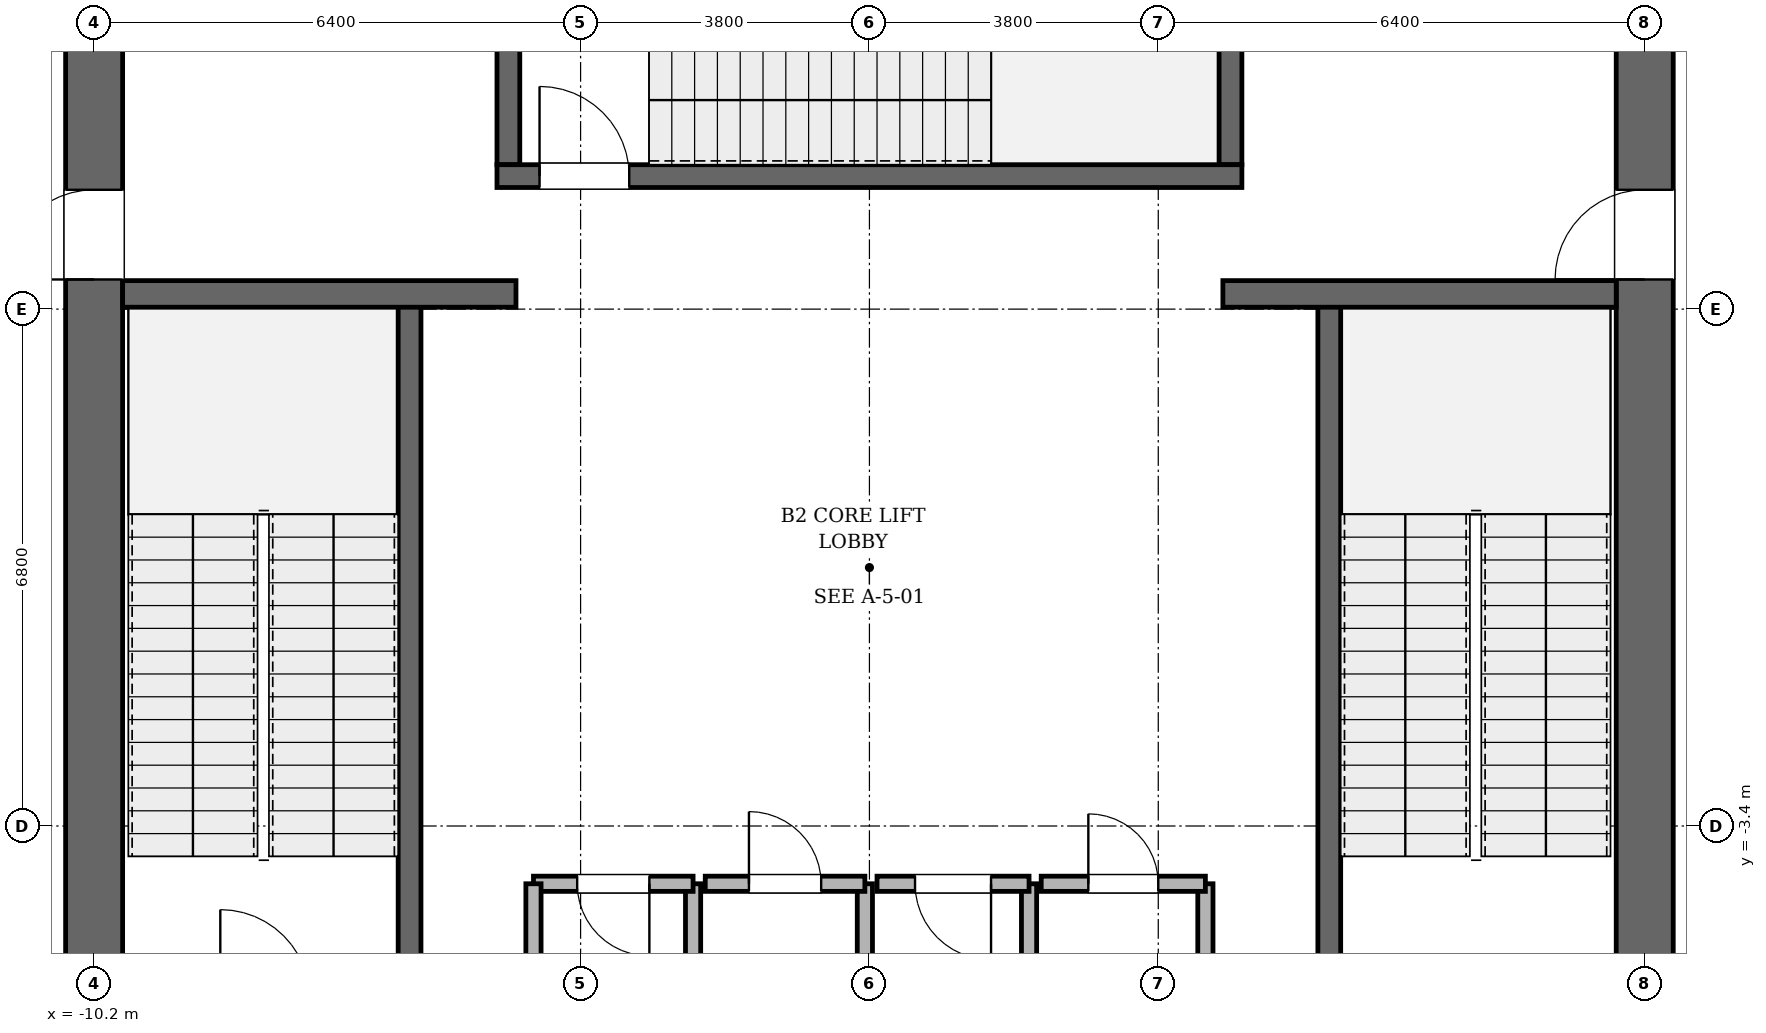
"""IFC4 building model, lengths in metres.
Left out: names, types, materials, properties, quantities, classifications, styles, units other than length and angle.
Written with IfcOpenShell. Run it as: python <this file> out.ifc"""

import sys

from ifc_helpers import new_model, si_unit, direction, frame, frame_2d, origin, place, context, subcontext, project, spatial, rectangle, extrude, element, fill, save


model = new_model("IFC4")
c1 = context("Model", 3, precision=1e-05, world=origin(), true_north=direction((0.0, 1.0)))
c2 = subcontext(c1, "Body", "Model", "MODEL_VIEW")
j1 = project(units=[si_unit("LENGTHUNIT", "METRE"), si_unit("PLANEANGLEUNIT", "RADIAN")], contexts=[c1])
p1 = place(None, origin())
s1 = spatial("IfcSite", under=j1, at=p1, CompositionType="ELEMENT")
p2 = place(p1, origin())
s2 = spatial("IfcBuilding", under=s1, at=p2, CompositionType="ELEMENT")
p3 = place(p2, frame((0.0, 0.0, -9.6)))
s3 = spatial("IfcBuildingStorey", under=s2, at=p3, CompositionType="ELEMENT", Elevation=-9.6)
p4 = place(p3, frame((-10.2, -8.825, 0.0), z_axis=(0.0, 0.0, 1.0), x_axis=(0.0, 1.0, 0.0)))
e1 = element("IfcWall", 1, at=p4, inside=s3, PredefinedType="SHEAR", context=c2, shape_type="SweptSolid", body=[
    extrude(rectangle(XDim=17.65, YDim=0.75, at=frame_2d((8.825, 0.0))), origin(), (0.0, 0.0, 1.0), 4.8),
])
p5 = place(p4, frame((12.615, 0.0, 0.0)))
e2 = element("IfcOpeningElement", 2, at=p5, cuts=e1, PredefinedType="OPENING", context=c2, shape_type="SweptSolid", body=[
    extrude(rectangle(XDim=1.18, YDim=2.2, at=frame_2d((0.59, 1.1))), frame((0.0, 0.385, 0.0), z_axis=(0.0, -1.0, 0.0), x_axis=(1.0, 0.0, 0.0)), (0.0, 0.0, 1.0), 0.77),
])
p6 = place(p3, frame((10.2, 8.825, 0.0), z_axis=(0.0, 0.0, 1.0), x_axis=(0.0, -1.0, 0.0)))
e3 = element("IfcWall", 3, at=p6, inside=s3, PredefinedType="SHEAR", context=c2, shape_type="SweptSolid", body=[
    extrude(rectangle(XDim=17.65, YDim=0.75, at=frame_2d((8.825, 0.0))), origin(), (0.0, 0.0, 1.0), 4.8),
])
p7 = place(p6, frame((3.855, 0.0, 0.0)))
e4 = element("IfcOpeningElement", 4, at=p7, cuts=e3, PredefinedType="OPENING", context=c2, shape_type="SweptSolid", body=[
    extrude(rectangle(XDim=1.18, YDim=2.2, at=frame_2d((0.59, 1.1))), frame((0.0, 0.385, 0.0), z_axis=(0.0, -1.0, 0.0), x_axis=(1.0, 0.0, 0.0)), (0.0, 0.0, 1.0), 0.77),
])
for number, where, z_axis, x_axis in (
    (5, (-6.05, -5.5, 0.0), (0.0, 0.0, 1.0), (0.0, 1.0, 0.0)),
    (6, (6.05, 3.45, 0.0), (0.0, 0.0, 1.0), (0.0, -1.0, 0.0)),
):
    element("IfcWall", number, at=place(p3, frame(where, z_axis=z_axis, x_axis=x_axis)), inside=s3, PredefinedType="SOLIDWALL", context=c2, shape_type="SweptSolid", body=[
        extrude(rectangle(XDim=8.95, YDim=0.3, at=frame_2d((4.475, 0.0))), origin(), (0.0, 0.0, 1.0), 4.8),
    ])
for number, where, z_axis, x_axis in (
    (7, (-4.75, 5.3, 0.0), (0.0, 0.0, 1.0), (0.0, 1.0, 0.0)),
    (8, (4.75, 8.825, 0.0), (0.0, 0.0, 1.0), (0.0, -1.0, 0.0)),
):
    element("IfcWall", number, at=place(p3, frame(where, z_axis=z_axis, x_axis=x_axis)), inside=s3, PredefinedType="SOLIDWALL", context=c2, shape_type="SweptSolid", body=[
        extrude(rectangle(XDim=3.525, YDim=0.3, at=frame_2d((1.762, 0.0))), origin(), (0.0, 0.0, 1.0), 4.8),
    ])
p8 = place(p3, frame((-4.9, 5.15, 0.0), z_axis=(0.0, 0.0, 1.0), x_axis=(1.0, 0.0, 0.0)))
e9 = element("IfcWall", 9, at=p8, inside=s3, PredefinedType="SOLIDWALL", context=c2, shape_type="SweptSolid", body=[
    extrude(rectangle(XDim=9.8, YDim=0.3, at=frame_2d((4.9, 0.0))), origin(), (0.0, 0.0, 1.0), 4.8),
])
p9 = place(p8, frame((0.56, 0.0, 0.0)))
e10 = element("IfcOpeningElement", 10, at=p9, cuts=e9, PredefinedType="OPENING", context=c2, shape_type="SweptSolid", body=[
    extrude(rectangle(XDim=1.18, YDim=2.2, at=frame_2d((0.59, 1.1))), frame((0.0, 0.16, 0.0), z_axis=(0.0, -1.0, 0.0), x_axis=(1.0, 0.0, 0.0)), (0.0, 0.0, 1.0), 0.32),
])
for number, where, z_axis, x_axis in (
    (11, (-9.825, 3.6, 0.0), (0.0, 0.0, 1.0), (1.0, 0.0, 0.0)),
    (12, (4.65, 3.6, 0.0), (0.0, 0.0, 1.0), (1.0, 0.0, 0.0)),
):
    element("IfcWall", number, at=place(p3, frame(where, z_axis=z_axis, x_axis=x_axis)), inside=s3, PredefinedType="SOLIDWALL", context=c2, shape_type="SweptSolid", body=[
        extrude(rectangle(XDim=5.175, YDim=0.35, at=frame_2d((2.587, 0.0))), origin(), (0.0, 0.0, 1.0), 4.8),
    ])
p10 = place(p3, frame((-2.32, -5.9, 0.0), z_axis=(0.0, 0.0, 1.0), x_axis=(0.0, 1.0, 0.0)))
e13 = element("IfcWall", 13, at=p10, inside=s3, PredefinedType="SOLIDWALL", context=c2, shape_type="SweptSolid", body=[
    extrude(rectangle(XDim=1.74, YDim=0.2, at=frame_2d((0.87, 0.0))), origin(), (0.0, 0.0, 1.0), 4.52),
])
p11 = place(p3, frame((-2.32, -4.16, 0.0), z_axis=(0.0, 0.0, 1.0), x_axis=(-1.0, 0.0, 0.0)))
e14 = element("IfcWall", 14, at=p11, inside=s3, PredefinedType="SOLIDWALL", context=c2, shape_type="SweptSolid", body=[
    extrude(rectangle(XDim=2.1, YDim=0.2, at=frame_2d((1.05, 0.0))), origin(), (0.0, 0.0, 1.0), 4.52),
])
p12 = place(p11, frame((0.575, 0.0, 0.0)))
e15 = element("IfcOpeningElement", 15, at=p12, cuts=e14, PredefinedType="OPENING", context=c2, shape_type="SweptSolid", body=[
    extrude(rectangle(XDim=0.95, YDim=2.15, at=frame_2d((0.475, 1.075))), frame((0.0, 0.11, 0.0), z_axis=(0.0, -1.0, 0.0), x_axis=(1.0, 0.0, 0.0)), (0.0, 0.0, 1.0), 0.22),
])
for number, where, z_axis, x_axis in (
    (16, (-4.42, -4.16, 0.0), (0.0, 0.0, 1.0), (0.0, -1.0, 0.0)),
    (17, (-0.06, -5.9, 0.0), (0.0, 0.0, 1.0), (0.0, 1.0, 0.0)),
):
    element("IfcWall", number, at=place(p3, frame(where, z_axis=z_axis, x_axis=x_axis)), inside=s3, PredefinedType="SOLIDWALL", context=c2, shape_type="SweptSolid", body=[
        extrude(rectangle(XDim=1.74, YDim=0.2, at=frame_2d((0.87, 0.0))), origin(), (0.0, 0.0, 1.0), 4.52),
    ])
p13 = place(p3, frame((-0.06, -4.16, 0.0), z_axis=(0.0, 0.0, 1.0), x_axis=(-1.0, 0.0, 0.0)))
e18 = element("IfcWall", 18, at=p13, inside=s3, PredefinedType="SOLIDWALL", context=c2, shape_type="SweptSolid", body=[
    extrude(rectangle(XDim=2.1, YDim=0.2, at=frame_2d((1.05, 0.0))), origin(), (0.0, 0.0, 1.0), 4.52),
])
p14 = place(p13, frame((0.575, 0.0, 0.0)))
e19 = element("IfcOpeningElement", 19, at=p14, cuts=e18, PredefinedType="OPENING", context=c2, shape_type="SweptSolid", body=[
    extrude(rectangle(XDim=0.95, YDim=2.15, at=frame_2d((0.475, 1.075))), frame((0.0, 0.11, 0.0), z_axis=(0.0, -1.0, 0.0), x_axis=(1.0, 0.0, 0.0)), (0.0, 0.0, 1.0), 0.22),
])
p15 = place(p3, frame((2.1, -5.9, 0.0), z_axis=(0.0, 0.0, 1.0), x_axis=(0.0, 1.0, 0.0)))
e20 = element("IfcWall", 20, at=p15, inside=s3, PredefinedType="SOLIDWALL", context=c2, shape_type="SweptSolid", body=[
    extrude(rectangle(XDim=1.74, YDim=0.2, at=frame_2d((0.87, 0.0))), origin(), (0.0, 0.0, 1.0), 4.52),
])
p16 = place(p3, frame((2.1, -4.16, 0.0), z_axis=(0.0, 0.0, 1.0), x_axis=(-1.0, 0.0, 0.0)))
e21 = element("IfcWall", 21, at=p16, inside=s3, PredefinedType="SOLIDWALL", context=c2, shape_type="SweptSolid", body=[
    extrude(rectangle(XDim=2.0, YDim=0.2, at=frame_2d((1.0, 0.0))), origin(), (0.0, 0.0, 1.0), 4.52),
])
p17 = place(p16, frame((0.5, 0.0, 0.0)))
e22 = element("IfcOpeningElement", 22, at=p17, cuts=e21, PredefinedType="OPENING", context=c2, shape_type="SweptSolid", body=[
    extrude(rectangle(XDim=1.0, YDim=2.15, at=frame_2d((0.5, 1.075))), frame((0.0, 0.11, 0.0), z_axis=(0.0, -1.0, 0.0), x_axis=(1.0, 0.0, 0.0)), (0.0, 0.0, 1.0), 0.22),
])
p18 = place(p3, frame((4.42, -5.9, 0.0), z_axis=(0.0, 0.0, 1.0), x_axis=(0.0, 1.0, 0.0)))
e23 = element("IfcWall", 23, at=p18, inside=s3, PredefinedType="SOLIDWALL", context=c2, shape_type="SweptSolid", body=[
    extrude(rectangle(XDim=1.74, YDim=0.2, at=frame_2d((0.87, 0.0))), origin(), (0.0, 0.0, 1.0), 4.52),
])
p19 = place(p3, frame((4.42, -4.16, 0.0), z_axis=(0.0, 0.0, 1.0), x_axis=(-1.0, 0.0, 0.0)))
e24 = element("IfcWall", 24, at=p19, inside=s3, PredefinedType="SOLIDWALL", context=c2, shape_type="SweptSolid", body=[
    extrude(rectangle(XDim=2.16, YDim=0.2, at=frame_2d((1.08, 0.0))), origin(), (0.0, 0.0, 1.0), 4.52),
])
p20 = place(p19, frame((0.62, 0.0, 0.0)))
e25 = element("IfcOpeningElement", 25, at=p20, cuts=e24, PredefinedType="OPENING", context=c2, shape_type="SweptSolid", body=[
    extrude(rectangle(XDim=0.92, YDim=2.1, at=frame_2d((0.46, 1.05))), frame((0.0, 0.11, 0.0), z_axis=(0.0, -1.0, 0.0), x_axis=(1.0, 0.0, 0.0)), (0.0, 0.0, 1.0), 0.22),
])
p21 = place(p9, origin())
e26 = element("IfcDoor", 26, at=p21, inside=s3, OperationType="SINGLE_SWING_LEFT", PredefinedType="DOOR", context=c2, shape_type="SweptSolid", body=[
    extrude(rectangle(XDim=1.18, YDim=2.2, at=frame_2d((0.59, 1.1))), frame((0.0, 0.025, 0.0), z_axis=(0.0, -1.0, 0.0), x_axis=(1.0, 0.0, 0.0)), (0.0, 0.0, 1.0), 0.05),
])
fill(e10, e26)
p22 = place(p5, origin())
e27 = element("IfcDoor", 27, at=p22, inside=s3, OperationType="SINGLE_SWING_LEFT", PredefinedType="DOOR", context=c2, shape_type="SweptSolid", body=[
    extrude(rectangle(XDim=1.18, YDim=2.2, at=frame_2d((0.59, 1.1))), frame((0.0, 0.025, 0.0), z_axis=(0.0, -1.0, 0.0), x_axis=(1.0, 0.0, 0.0)), (0.0, 0.0, 1.0), 0.05),
])
fill(e2, e27)
p23 = place(p7, origin())
e28 = element("IfcDoor", 28, at=p23, inside=s3, OperationType="SINGLE_SWING_RIGHT", PredefinedType="DOOR", context=c2, shape_type="SweptSolid", body=[
    extrude(rectangle(XDim=1.18, YDim=2.2, at=frame_2d((0.59, 1.1))), frame((0.0, 0.025, 0.0), z_axis=(0.0, -1.0, 0.0), x_axis=(1.0, 0.0, 0.0)), (0.0, 0.0, 1.0), 0.05),
])
fill(e4, e28)
p24 = place(p12, origin())
e29 = element("IfcDoor", 29, at=p24, inside=s3, OperationType="SINGLE_SWING_LEFT", PredefinedType="DOOR", context=c2, shape_type="SweptSolid", body=[
    extrude(rectangle(XDim=0.95, YDim=2.15, at=frame_2d((0.475, 1.075))), frame((0.0, 0.025, 0.0), z_axis=(0.0, -1.0, 0.0), x_axis=(1.0, 0.0, 0.0)), (0.0, 0.0, 1.0), 0.05),
])
fill(e15, e29)
p25 = place(p14, origin())
e30 = element("IfcDoor", 30, at=p25, inside=s3, OperationType="SINGLE_SWING_RIGHT", PredefinedType="DOOR", context=c2, shape_type="SweptSolid", body=[
    extrude(rectangle(XDim=0.95, YDim=2.15, at=frame_2d((0.475, 1.075))), frame((0.0, 0.025, 0.0), z_axis=(0.0, -1.0, 0.0), x_axis=(1.0, 0.0, 0.0)), (0.0, 0.0, 1.0), 0.05),
])
fill(e19, e30)
p26 = place(p17, origin())
e31 = element("IfcDoor", 31, at=p26, inside=s3, OperationType="SINGLE_SWING_LEFT", PredefinedType="DOOR", context=c2, shape_type="SweptSolid", body=[
    extrude(rectangle(XDim=1.0, YDim=2.15, at=frame_2d((0.5, 1.075))), frame((0.0, 0.025, 0.0), z_axis=(0.0, -1.0, 0.0), x_axis=(1.0, 0.0, 0.0)), (0.0, 0.0, 1.0), 0.05),
])
fill(e22, e31)
p27 = place(p20, origin())
e32 = element("IfcDoor", 32, at=p27, inside=s3, OperationType="SINGLE_SWING_RIGHT", PredefinedType="DOOR", context=c2, shape_type="SweptSolid", body=[
    extrude(rectangle(XDim=0.92, YDim=2.1, at=frame_2d((0.46, 1.05))), frame((0.0, 0.025, 0.0), z_axis=(0.0, -1.0, 0.0), x_axis=(1.0, 0.0, 0.0)), (0.0, 0.0, 1.0), 0.05),
])
fill(e25, e32)
save(model, sys.argv[1])
